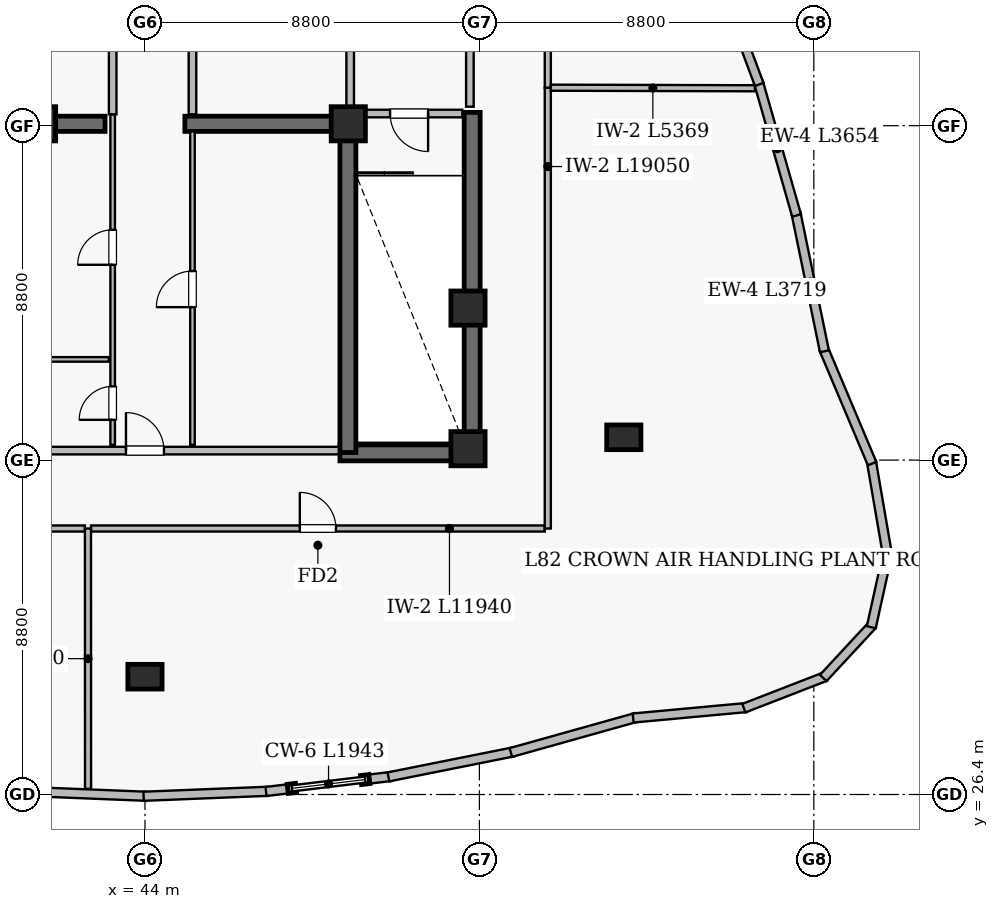
"""IFC4 building model, lengths in metres.
Left out: names, types, materials, properties, quantities, classifications, styles, units other than length and angle.
Written with IfcOpenShell. Run it as: python <this file> out.ifc"""

import sys

from ifc_helpers import new_model, si_unit, direction, frame, frame_2d, origin, origin_2d, place, context, subcontext, project, spatial, rectangle, extrude, element, fill, save


model = new_model("IFC4")
c1 = context("Model", 3, precision=1e-05, world=origin(), true_north=direction((0.0, 1.0)))
c2 = subcontext(c1, "Body", "Model", "MODEL_VIEW")
j1 = project(units=[si_unit("LENGTHUNIT", "METRE"), si_unit("PLANEANGLEUNIT", "RADIAN")], contexts=[c1])
p1 = place(None, origin())
s1 = spatial("IfcSite", under=j1, at=p1, CompositionType="ELEMENT")
p2 = place(p1, origin())
s2 = spatial("IfcBuilding", under=s1, at=p2, CompositionType="ELEMENT")
p3 = place(p2, frame((0.0, 0.0, 312.8)))
s3 = spatial("IfcBuildingStorey", under=s2, at=p3, CompositionType="ELEMENT", Elevation=312.8)
p4 = place(p3, frame((49.13, 35.39, 0.0), z_axis=(0.0, 0.0, 1.0), x_axis=(1.0, 0.0, 0.0)))
e1 = element("IfcWall", 1, at=p4, inside=s3, PredefinedType="SHEAR", context=c2, shape_type="SweptSolid", body=[
    extrude(rectangle(XDim=3.69, YDim=0.42, at=frame_2d((1.845, 0.0))), origin(), (0.0, 0.0, 1.0), 4.99),
])
p5 = place(p3, frame((52.61, 35.18, 0.0), z_axis=(0.0, 0.0, 1.0), x_axis=(0.0, 1.0, 0.0)))
e2 = element("IfcWall", 2, at=p5, inside=s3, PredefinedType="SHEAR", context=c2, shape_type="SweptSolid", body=[
    extrude(rectangle(XDim=9.17, YDim=0.42, at=frame_2d((4.585, 0.0))), origin(), (0.0, 0.0, 1.0), 4.99),
])
p6 = place(p3, frame((49.34, 35.4, 0.0), z_axis=(0.0, 0.0, 1.0), x_axis=(0.0, 1.0, 0.0)))
e3 = element("IfcWall", 3, at=p6, inside=s3, PredefinedType="SHEAR", context=c2, shape_type="SweptSolid", body=[
    extrude(rectangle(XDim=8.95, YDim=0.42, at=frame_2d((4.475, 0.0))), origin(), (0.0, 0.0, 1.0), 4.99),
])
for number, where, z_axis, x_axis in (
    (4, (38.75, 44.05, 0.0), (0.0, 0.0, 1.0), (1.0, 0.0, 0.0)),
    (5, (45.05, 44.05, 0.0), (0.0, 0.0, 1.0), (1.0, 0.0, 0.0)),
):
    element("IfcWall", number, at=place(p3, frame(where, z_axis=z_axis, x_axis=x_axis)), inside=s3, PredefinedType="SHEAR", context=c2, shape_type="SweptSolid", body=[
        extrude(rectangle(XDim=4.2, YDim=0.4, at=frame_2d((2.1, 0.0))), origin(), (0.0, 0.0, 1.0), 4.99),
    ])
for number, where, z_axis, x_axis in (
    (6, (52.5, 35.5, 0.0), (0.0, 0.0, 1.0), (1.0, 0.0, 0.0)),
    (7, (52.5, 39.2, 0.0), (0.0, 0.0, 1.0), (1.0, 0.0, 0.0)),
    (8, (49.35, 44.05, 0.0), (0.0, 0.0, 1.0), (1.0, 0.0, 0.0)),
    (9, (41.2, 44.05, 0.0), (0.0, 0.0, 1.0), (1.0, 0.0, 0.0)),
):
    element("IfcColumn", number, at=place(p3, frame(where, z_axis=z_axis, x_axis=x_axis)), inside=s3, PredefinedType="COLUMN", context=c2, shape_type="SweptSolid", body=[
        extrude(rectangle(XDim=0.9, YDim=0.9, at=origin_2d()), origin(), (0.0, 0.0, 1.0), 5.2),
    ])
for number, where, z_axis, x_axis in (
    (10, (56.6, 35.8, 0.0), (0.0, 0.0, 1.0), (1.0, 0.0, 0.0)),
    (11, (44.0, 29.5, 0.0), (0.0, 0.0, 1.0), (1.0, 0.0, 0.0)),
):
    element("IfcColumn", number, at=place(p3, frame(where, z_axis=z_axis, x_axis=x_axis)), inside=s3, PredefinedType="COLUMN", context=c2, shape_type="SweptSolid", body=[
        extrude(rectangle(XDim=0.9, YDim=0.65, at=origin_2d()), origin(), (0.0, 0.0, 1.0), 5.2),
    ])
for number, where, z_axis, x_axis in (
    (12, (40.745, 26.485, 0.0), (0.0, 0.0, 1.0), (0.999, -0.04, 0.0)),
    (13, (43.965, 26.354, 0.0), (0.0, 0.0, 1.0), (0.999, 0.04, 0.0)),
):
    element("IfcWall", number, at=place(p3, frame(where, z_axis=z_axis, x_axis=x_axis)), inside=s3, PredefinedType="SOLIDWALL", context=c2, shape_type="SweptSolid", body=[
        extrude(rectangle(XDim=3.293, YDim=0.24, at=frame_2d((1.646, 0.0))), origin(), (0.0, 0.0, 1.0), 4.99),
    ])
p7 = place(p3, frame((47.186, 26.479, 0.0), z_axis=(0.0, 0.0, 1.0), x_axis=(0.992837457138, 0.119472941302, 0.0)))
e14 = element("IfcWall", 14, at=p7, inside=s3, PredefinedType="SOLIDWALL", context=c2, shape_type="SweptSolid", body=[
    extrude(rectangle(XDim=0.705, YDim=0.24, at=frame_2d((0.353, 0.0))), origin(), (0.0, 0.0, 1.0), 4.99),
])
p8 = place(p3, frame((49.775, 26.79, 0.0), z_axis=(0.0, 0.0, 1.0), x_axis=(0.992847332927, 0.119390843451, 0.0)))
e15 = element("IfcWall", 15, at=p8, inside=s3, PredefinedType="SOLIDWALL", context=c2, shape_type="SweptSolid", body=[
    extrude(rectangle(XDim=0.706, YDim=0.24, at=frame_2d((0.353, 0.0))), origin(), (0.0, 0.0, 1.0), 4.99),
])
p9 = place(p3, frame((50.406, 26.863, 0.0), z_axis=(0.0, 0.0, 1.0), x_axis=(0.980569475455, 0.196172128005, 0.0)))
e16 = element("IfcWall", 16, at=p9, inside=s3, PredefinedType="SOLIDWALL", context=c2, shape_type="SweptSolid", body=[
    extrude(rectangle(XDim=3.354, YDim=0.24, at=frame_2d((1.677, 0.0))), origin(), (0.0, 0.0, 1.0), 4.99),
])
p10 = place(p3, frame((53.627, 27.505, 0.0), z_axis=(0.0, 0.0, 1.0), x_axis=(0.962972931592, 0.269598095359, 0.0)))
e17 = element("IfcWall", 17, at=p10, inside=s3, PredefinedType="SOLIDWALL", context=c2, shape_type="SweptSolid", body=[
    extrude(rectangle(XDim=3.414, YDim=0.24, at=frame_2d((1.707, 0.0))), origin(), (0.0, 0.0, 1.0), 4.99),
])
p11 = place(p3, frame((56.846, 28.413, 0.0), z_axis=(0.0, 0.0, 1.0), x_axis=(0.995767942029, 0.091903240575, 0.0)))
e18 = element("IfcWall", 18, at=p11, inside=s3, PredefinedType="SOLIDWALL", context=c2, shape_type="SweptSolid", body=[
    extrude(rectangle(XDim=2.994, YDim=0.24, at=frame_2d((1.497, 0.0))), origin(), (0.0, 0.0, 1.0), 4.99),
])
p12 = place(p3, frame((59.76, 28.672, 0.0), z_axis=(0.0, 0.0, 1.0), x_axis=(0.932269297358, 0.361765058019, 0.0)))
e19 = element("IfcWall", 19, at=p12, inside=s3, PredefinedType="SOLIDWALL", context=c2, shape_type="SweptSolid", body=[
    extrude(rectangle(XDim=2.301, YDim=0.24, at=frame_2d((1.15, 0.0))), origin(), (0.0, 0.0, 1.0), 4.99),
])
p13 = place(p3, frame((61.848, 29.466, 0.0), z_axis=(0.0, 0.0, 1.0), x_axis=(0.680072395428, 0.733144963139, 0.0)))
e20 = element("IfcWall", 20, at=p13, inside=s3, PredefinedType="SOLIDWALL", context=c2, shape_type="SweptSolid", body=[
    extrude(rectangle(XDim=1.905, YDim=0.24, at=frame_2d((0.952, 0.0))), origin(), (0.0, 0.0, 1.0), 4.99),
])
p14 = place(p3, frame((63.112, 30.802, 0.0), z_axis=(0.0, 0.0, 1.0), x_axis=(0.215649526387, 0.976470829963, 0.0)))
e21 = element("IfcWall", 21, at=p14, inside=s3, PredefinedType="SOLIDWALL", context=c2, shape_type="SweptSolid", body=[
    extrude(rectangle(XDim=1.998, YDim=0.24, at=frame_2d((0.999, 0.0))), origin(), (0.0, 0.0, 1.0), 4.99),
])
p15 = place(p3, frame((63.542, 32.685, 0.0), z_axis=(0.0, 0.0, 1.0), x_axis=(-0.169240125324, 0.985574847477, 0.0)))
e22 = element("IfcWall", 22, at=p15, inside=s3, PredefinedType="SOLIDWALL", context=c2, shape_type="SweptSolid", body=[
    extrude(rectangle(XDim=2.526, YDim=0.24, at=frame_2d((1.263, 0.0))), origin(), (0.0, 0.0, 1.0), 4.99),
])
p16 = place(p3, frame((63.133, 35.107, 0.0), z_axis=(0.0, 0.0, 1.0), x_axis=(-0.388622520849, 0.921397056805, 0.0)))
e23 = element("IfcWall", 23, at=p16, inside=s3, PredefinedType="SOLIDWALL", context=c2, shape_type="SweptSolid", body=[
    extrude(rectangle(XDim=3.281, YDim=0.24, at=frame_2d((1.64, 0.0))), origin(), (0.0, 0.0, 1.0), 4.99),
])
p17 = place(p3, frame((61.879, 38.064, 0.0), z_axis=(0.0, 0.0, 1.0), x_axis=(-0.201578837363, 0.979472292782, 0.0)))
e24 = element("IfcWall", 24, at=p17, inside=s3, PredefinedType="SOLIDWALL", context=c2, shape_type="SweptSolid", body=[
    extrude(rectangle(XDim=3.719, YDim=0.24, at=frame_2d((1.86, 0.0))), origin(), (0.0, 0.0, 1.0), 4.99),
])
p18 = place(p3, frame((61.146, 41.639, 0.0), z_axis=(0.0, 0.0, 1.0), x_axis=(-0.274897629025, 0.961473501224, 0.0)))
e25 = element("IfcWall", 25, at=p18, inside=s3, PredefinedType="SOLIDWALL", context=c2, shape_type="SweptSolid", body=[
    extrude(rectangle(XDim=3.654, YDim=0.24, at=frame_2d((1.827, 0.0))), origin(), (0.0, 0.0, 1.0), 4.99),
])
p19 = place(p3, frame((60.163, 45.085, 0.0), z_axis=(0.0, 0.0, 1.0), x_axis=(-0.349054279873, 0.937102507574, 0.0)))
e26 = element("IfcWall", 26, at=p19, inside=s3, PredefinedType="SOLIDWALL", context=c2, shape_type="SweptSolid", body=[
    extrude(rectangle(XDim=3.609, YDim=0.24, at=frame_2d((1.805, 0.0))), origin(), (0.0, 0.0, 1.0), 4.99),
])
p20 = place(p3, frame((42.58, 33.4, 0.0), z_axis=(0.0, 0.0, 1.0), x_axis=(1.0, 0.0, 0.0)))
e27 = element("IfcWall", 27, at=p20, inside=s3, PredefinedType="SOLIDWALL", context=c2, shape_type="SweptSolid", body=[
    extrude(rectangle(XDim=11.94, YDim=0.16, at=frame_2d((5.97, 0.0))), origin(), (0.0, 0.0, 1.0), 4.178),
])
p21 = place(p20, frame((5.495, 0.0, 0.0)))
e28 = element("IfcOpeningElement", 28, at=p21, cuts=e27, PredefinedType="OPENING", context=c2, shape_type="SweptSolid", body=[
    extrude(rectangle(XDim=0.95, YDim=2.15, at=frame_2d((0.475, 1.075))), frame((0.0, 0.09, 0.0), z_axis=(0.0, -1.0, 0.0), x_axis=(1.0, 0.0, 0.0)), (0.0, 0.0, 1.0), 0.18),
])
p22 = place(p3, frame((38.9, 35.45, 0.0), z_axis=(0.0, 0.0, 1.0), x_axis=(1.0, 0.0, 0.0)))
e29 = element("IfcWall", 29, at=p22, inside=s3, PredefinedType="SOLIDWALL", context=c2, shape_type="SweptSolid", body=[
    extrude(rectangle(XDim=10.2, YDim=0.2, at=frame_2d((5.1, 0.0))), origin(), (0.0, 0.0, 1.0), 4.99),
])
p23 = place(p22, frame((4.6, 0.0, 0.0)))
e30 = element("IfcOpeningElement", 30, at=p23, cuts=e29, PredefinedType="OPENING", context=c2, shape_type="SweptSolid", body=[
    extrude(rectangle(XDim=1.0, YDim=2.15, at=frame_2d((0.5, 1.075))), frame((0.0, 0.11, 0.0), z_axis=(0.0, -1.0, 0.0), x_axis=(1.0, 0.0, 0.0)), (0.0, 0.0, 1.0), 0.22),
])
p24 = place(p3, frame((43.15, 35.6, 0.0), z_axis=(0.0, 0.0, 1.0), x_axis=(0.0, 1.0, 0.0)))
e31 = element("IfcWall", 31, at=p24, inside=s3, PredefinedType="PARTITIONING", context=c2, shape_type="SweptSolid", body=[
    extrude(rectangle(XDim=8.7, YDim=0.12, at=frame_2d((4.35, 0.0))), origin(), (0.0, 0.0, 1.0), 4.99),
])
p25 = place(p24, frame((0.66, 0.0, 0.0)))
e32 = element("IfcOpeningElement", 32, at=p25, cuts=e31, PredefinedType="OPENING", context=c2, shape_type="SweptSolid", body=[
    extrude(rectangle(XDim=0.88, YDim=2.1, at=frame_2d((0.44, 1.05))), frame((0.0, 0.07, 0.0), z_axis=(0.0, -1.0, 0.0), x_axis=(1.0, 0.0, 0.0)), (0.0, 0.0, 1.0), 0.14),
])
p26 = place(p24, frame((4.74, 0.0, 0.0)))
e33 = element("IfcOpeningElement", 33, at=p26, cuts=e31, PredefinedType="OPENING", context=c2, shape_type="SweptSolid", body=[
    extrude(rectangle(XDim=0.92, YDim=2.1, at=frame_2d((0.46, 1.05))), frame((0.0, 0.07, 0.0), z_axis=(0.0, -1.0, 0.0), x_axis=(1.0, 0.0, 0.0)), (0.0, 0.0, 1.0), 0.14),
])
p27 = place(p3, frame((45.25, 35.6, 0.0), z_axis=(0.0, 0.0, 1.0), x_axis=(0.0, 1.0, 0.0)))
e34 = element("IfcWall", 34, at=p27, inside=s3, PredefinedType="PARTITIONING", context=c2, shape_type="SweptSolid", body=[
    extrude(rectangle(XDim=8.25, YDim=0.12, at=frame_2d((4.125, 0.0))), origin(), (0.0, 0.0, 1.0), 4.99),
])
p28 = place(p27, frame((3.625, 0.0, 0.0)))
e35 = element("IfcOpeningElement", 35, at=p28, cuts=e34, PredefinedType="OPENING", context=c2, shape_type="SweptSolid", body=[
    extrude(rectangle(XDim=0.95, YDim=2.1, at=frame_2d((0.475, 1.05))), frame((0.0, 0.07, 0.0), z_axis=(0.0, -1.0, 0.0), x_axis=(1.0, 0.0, 0.0)), (0.0, 0.0, 1.0), 0.14),
])
p29 = place(p3, frame((52.55, 44.5, 0.0), z_axis=(0.0, 0.0, 1.0), x_axis=(0.0, 1.0, 0.0)))
e36 = element("IfcWall", 36, at=p29, inside=s3, PredefinedType="SOLIDWALL", context=c2, shape_type="SweptSolid", body=[
    extrude(rectangle(XDim=7.92, YDim=0.2, at=frame_2d((3.96, 0.0))), origin(), (0.0, 0.0, 1.0), 4.99),
])
p30 = place(p29, frame((2.6, 0.0, 0.0)))
e37 = element("IfcOpeningElement", 37, at=p30, cuts=e36, PredefinedType="OPENING", context=c2, shape_type="SweptSolid", body=[
    extrude(rectangle(XDim=1.0, YDim=2.15, at=frame_2d((0.5, 1.075))), frame((0.0, 0.11, 0.0), z_axis=(0.0, -1.0, 0.0), x_axis=(1.0, 0.0, 0.0)), (0.0, 0.0, 1.0), 0.22),
])
p31 = place(p3, frame((49.4, 44.5, 0.0), z_axis=(0.0, 0.0, 1.0), x_axis=(0.0, 1.0, 0.0)))
e38 = element("IfcWall", 38, at=p31, inside=s3, PredefinedType="SOLIDWALL", context=c2, shape_type="SweptSolid", body=[
    extrude(rectangle(XDim=7.92, YDim=0.2, at=frame_2d((3.96, 0.0))), origin(), (0.0, 0.0, 1.0), 4.078),
])
p32 = place(p31, frame((3.425, 0.0, 0.0)))
e39 = element("IfcOpeningElement", 39, at=p32, cuts=e38, PredefinedType="OPENING", context=c2, shape_type="SweptSolid", body=[
    extrude(rectangle(XDim=0.95, YDim=2.15, at=frame_2d((0.475, 1.075))), frame((0.0, 0.11, 0.0), z_axis=(0.0, -1.0, 0.0), x_axis=(1.0, 0.0, 0.0)), (0.0, 0.0, 1.0), 0.22),
])
p33 = place(p3, frame((49.55, 44.32, 0.0), z_axis=(0.0, 0.0, 1.0), x_axis=(1.0, 0.0, 0.0)))
e40 = element("IfcWall", 40, at=p33, inside=s3, PredefinedType="SOLIDWALL", context=c2, shape_type="SweptSolid", body=[
    extrude(rectangle(XDim=2.8, YDim=0.2, at=frame_2d((1.4, 0.0))), origin(), (0.0, 0.0, 1.0), 4.078),
])
p34 = place(p33, frame((0.9, 0.0, 0.0)))
e41 = element("IfcOpeningElement", 41, at=p34, cuts=e40, PredefinedType="OPENING", context=c2, shape_type="SweptSolid", body=[
    extrude(rectangle(XDim=1.0, YDim=2.15, at=frame_2d((0.5, 1.075))), frame((0.0, 0.11, 0.0), z_axis=(0.0, -1.0, 0.0), x_axis=(1.0, 0.0, 0.0)), (0.0, 0.0, 1.0), 0.22),
])
p35 = place(p3, frame((54.6, 33.4, 0.0), z_axis=(0.0, 0.0, 1.0), x_axis=(0.0, 1.0, 0.0)))
e42 = element("IfcWall", 42, at=p35, inside=s3, PredefinedType="SOLIDWALL", context=c2, shape_type="SweptSolid", body=[
    extrude(rectangle(XDim=11.6, YDim=0.16, at=frame_2d((5.8, 0.0))), origin(), (0.0, 0.0, 1.0), 4.178),
])
p36 = place(p3, frame((33.48, 33.4, 0.0), z_axis=(0.0, 0.0, 1.0), x_axis=(1.0, 0.0, 0.0)))
e43 = element("IfcWall", 43, at=p36, inside=s3, PredefinedType="SOLIDWALL", context=c2, shape_type="SweptSolid", body=[
    extrude(rectangle(XDim=8.94, YDim=0.16, at=frame_2d((4.47, 0.0))), origin(), (0.0, 0.0, 1.0), 4.178),
])
p37 = place(p3, frame((54.6, 45.0, 0.0), z_axis=(0.0, 0.0, 1.0), x_axis=(0.0, 1.0, 0.0)))
e44 = element("IfcWall", 44, at=p37, inside=s3, PredefinedType="SOLIDWALL", context=c2, shape_type="SweptSolid", body=[
    extrude(rectangle(XDim=7.45, YDim=0.16, at=frame_2d((3.725, 0.0))), origin(), (0.0, 0.0, 1.0), 4.178),
])
p38 = place(p3, frame((42.502, 26.55, 0.0), z_axis=(0.0, 0.0, 1.0), x_axis=(-0.000285133823, 0.999999959349, 0.0)))
e45 = element("IfcWall", 45, at=p38, inside=s3, PredefinedType="SOLIDWALL", context=c2, shape_type="SweptSolid", body=[
    extrude(rectangle(XDim=6.85, YDim=0.16, at=frame_2d((3.425, 0.0))), origin(), (0.0, 0.0, 1.0), 4.178),
])
p39 = place(p3, frame((60.049, 44.985, 0.0), z_axis=(0.0, 0.0, 1.0), x_axis=(-0.999996153217, 0.002773725234, 0.0)))
e46 = element("IfcWall", 46, at=p39, inside=s3, PredefinedType="SOLIDWALL", context=c2, shape_type="SweptSolid", body=[
    extrude(rectangle(XDim=5.369, YDim=0.16, at=frame_2d((2.685, 0.0))), origin(), (0.0, 0.0, 1.0), 4.178),
])
p40 = place(p3, frame((38.75, 37.85, 0.0), z_axis=(0.0, 0.0, 1.0), x_axis=(1.0, 0.0, 0.0)))
e47 = element("IfcWall", 47, at=p40, inside=s3, PredefinedType="PARTITIONING", context=c2, shape_type="SweptSolid", body=[
    extrude(rectangle(XDim=4.3, YDim=0.12, at=frame_2d((2.15, 0.0))), origin(), (0.0, 0.0, 1.0), 4.99),
])
for number, where, z_axis, x_axis in (
    (48, (43.15, 44.3, 0.0), (0.0, 0.0, 1.0), (0.0, 1.0, 0.0)),
    (49, (45.25, 44.3, 0.0), (0.0, 0.0, 1.0), (0.0, 1.0, 0.0)),
):
    element("IfcWall", number, at=place(p3, frame(where, z_axis=z_axis, x_axis=x_axis)), inside=s3, PredefinedType="SOLIDWALL", context=c2, shape_type="SweptSolid", body=[
        extrude(rectangle(XDim=2.58, YDim=0.2, at=frame_2d((1.29, 0.0))), origin(), (0.0, 0.0, 1.0), 4.99),
    ])
p41 = place(p34, frame((1.0, 0.0, 0.0), z_axis=(0.0, 0.0, 1.0), x_axis=(-1.0, 0.0, 0.0)))
e50 = element("IfcDoor", 50, at=p41, inside=s3, OperationType="SINGLE_SWING_RIGHT", PredefinedType="DOOR", context=c2, shape_type="SweptSolid", body=[
    extrude(rectangle(XDim=1.0, YDim=2.15, at=frame_2d((0.5, 1.075))), frame((0.0, 0.025, 0.0), z_axis=(0.0, -1.0, 0.0), x_axis=(1.0, 0.0, 0.0)), (0.0, 0.0, 1.0), 0.05),
])
fill(e41, e50)
p42 = place(p23, origin())
e51 = element("IfcDoor", 51, at=p42, inside=s3, OperationType="SINGLE_SWING_LEFT", PredefinedType="DOOR", context=c2, shape_type="SweptSolid", body=[
    extrude(rectangle(XDim=1.0, YDim=2.15, at=frame_2d((0.5, 1.075))), frame((0.0, 0.025, 0.0), z_axis=(0.0, -1.0, 0.0), x_axis=(1.0, 0.0, 0.0)), (0.0, 0.0, 1.0), 0.05),
])
fill(e30, e51)
p43 = place(p25, origin())
e52 = element("IfcDoor", 52, at=p43, inside=s3, OperationType="SINGLE_SWING_LEFT", PredefinedType="DOOR", context=c2, shape_type="SweptSolid", body=[
    extrude(rectangle(XDim=0.88, YDim=2.1, at=frame_2d((0.44, 1.05))), frame((0.0, 0.025, 0.0), z_axis=(0.0, -1.0, 0.0), x_axis=(1.0, 0.0, 0.0)), (0.0, 0.0, 1.0), 0.05),
])
fill(e32, e52)
p44 = place(p26, origin())
e53 = element("IfcDoor", 53, at=p44, inside=s3, OperationType="SINGLE_SWING_LEFT", PredefinedType="DOOR", context=c2, shape_type="SweptSolid", body=[
    extrude(rectangle(XDim=0.92, YDim=2.1, at=frame_2d((0.46, 1.05))), frame((0.0, 0.025, 0.0), z_axis=(0.0, -1.0, 0.0), x_axis=(1.0, 0.0, 0.0)), (0.0, 0.0, 1.0), 0.05),
])
fill(e33, e53)
p45 = place(p28, origin())
e54 = element("IfcDoor", 54, at=p45, inside=s3, OperationType="SINGLE_SWING_LEFT", PredefinedType="DOOR", context=c2, shape_type="SweptSolid", body=[
    extrude(rectangle(XDim=0.95, YDim=2.1, at=frame_2d((0.475, 1.05))), frame((0.0, 0.025, 0.0), z_axis=(0.0, -1.0, 0.0), x_axis=(1.0, 0.0, 0.0)), (0.0, 0.0, 1.0), 0.05),
])
fill(e35, e54)
p46 = place(p21, origin())
e55 = element("IfcDoor", 55, at=p46, inside=s3, OperationType="SINGLE_SWING_LEFT", PredefinedType="DOOR", context=c2, shape_type="SweptSolid", body=[
    extrude(rectangle(XDim=0.95, YDim=2.15, at=frame_2d((0.475, 1.075))), frame((0.0, 0.025, 0.0), z_axis=(0.0, -1.0, 0.0), x_axis=(1.0, 0.0, 0.0)), (0.0, 0.0, 1.0), 0.05),
])
fill(e28, e55)
save(model, sys.argv[1])
